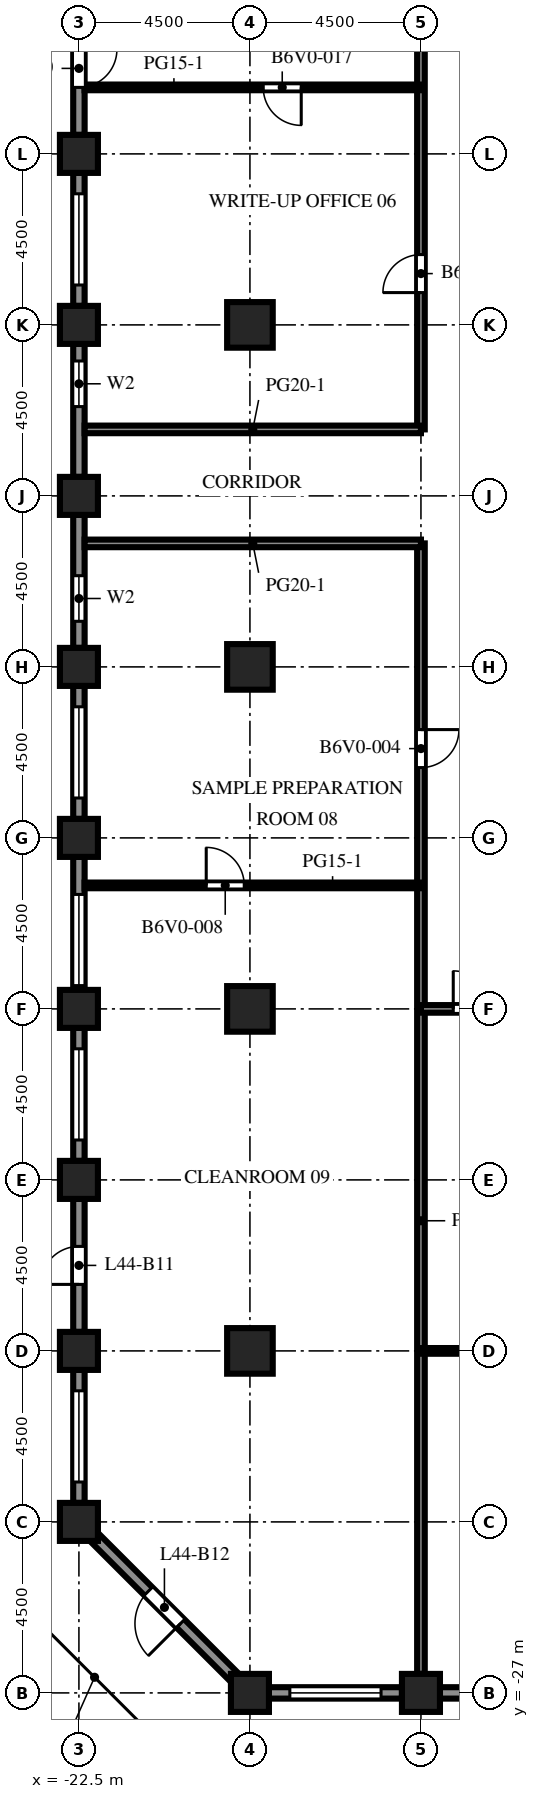
"""IFC4 building model, lengths in metres.
Left out: names, types, materials, properties, quantities, classifications, styles, units other than length and angle.
Written with IfcOpenShell. Run it as: python <this file> out.ifc"""

import sys

from ifc_helpers import new_model, si_unit, direction, frame, frame_2d, origin, origin_2d, place, context, subcontext, project, spatial, rectangle, extrude, element, fill, save


model = new_model("IFC4")
c1 = context("Model", 3, precision=1e-05, world=origin(), true_north=direction((0.0, 1.0)))
c2 = subcontext(c1, "Body", "Model", "MODEL_VIEW")
j1 = project(units=[si_unit("LENGTHUNIT", "METRE"), si_unit("PLANEANGLEUNIT", "RADIAN")], contexts=[c1])
p1 = place(None, origin())
s1 = spatial("IfcSite", under=j1, at=p1, CompositionType="ELEMENT")
p2 = place(p1, origin())
s2 = spatial("IfcBuilding", under=s1, at=p2, CompositionType="ELEMENT")
p3 = place(p2, frame((0.0, 0.0, 195.6)))
s3 = spatial("IfcBuildingStorey", under=s2, at=p3, CompositionType="ELEMENT", Elevation=195.6)
for number, where, z_axis, x_axis in (
    (1, (-22.5, -22.5, 0.0), (0.0, 0.0, 1.0), (1.0, 0.0, 0.0)),
    (2, (-22.5, -18.0, 0.0), (0.0, 0.0, 1.0), (1.0, 0.0, 0.0)),
    (3, (-22.5, -13.5, 0.0), (0.0, 0.0, 1.0), (1.0, 0.0, 0.0)),
    (4, (-22.5, -9.0, 0.0), (0.0, 0.0, 1.0), (1.0, 0.0, 0.0)),
    (5, (-22.5, -4.5, 0.0), (0.0, 0.0, 1.0), (1.0, 0.0, 0.0)),
    (6, (-22.5, 0.0, 0.0), (0.0, 0.0, 1.0), (1.0, 0.0, 0.0)),
    (7, (-22.5, 4.5, 0.0), (0.0, 0.0, 1.0), (1.0, 0.0, 0.0)),
    (8, (-22.5, 9.0, 0.0), (0.0, 0.0, 1.0), (1.0, 0.0, 0.0)),
    (9, (-22.5, 13.5, 0.0), (0.0, 0.0, 1.0), (1.0, 0.0, 0.0)),
    (10, (-18.0, -27.0, 0.0), (0.0, 0.0, 1.0), (1.0, 0.0, 0.0)),
    (11, (-13.5, -27.0, 0.0), (0.0, 0.0, 1.0), (1.0, 0.0, 0.0)),
):
    element("IfcColumn", number, at=place(p3, frame(where, z_axis=z_axis, x_axis=x_axis)), inside=s3, PredefinedType="COLUMN", context=c2, shape_type="SweptSolid", body=[
        extrude(rectangle(XDim=1.0, YDim=1.0, at=origin_2d()), origin(), (0.0, 0.0, 1.0), 4.1),
    ])
for number, where, z_axis, x_axis in (
    (12, (-18.0, -18.0, 0.0), (0.0, 0.0, 1.0), (1.0, 0.0, 0.0)),
    (13, (-18.0, -9.0, 0.0), (0.0, 0.0, 1.0), (1.0, 0.0, 0.0)),
    (14, (-18.0, 0.0, 0.0), (0.0, 0.0, 1.0), (1.0, 0.0, 0.0)),
    (15, (-18.0, 9.0, 0.0), (0.0, 0.0, 1.0), (1.0, 0.0, 0.0)),
):
    element("IfcColumn", number, at=place(p3, frame(where, z_axis=z_axis, x_axis=x_axis)), inside=s3, PredefinedType="COLUMN", context=c2, shape_type="SweptSolid", body=[
        extrude(rectangle(XDim=1.2, YDim=1.2, at=origin_2d()), origin(), (0.0, 0.0, 1.0), 4.1),
    ])
p4 = place(p3, frame((-14.0, -27.0, 0.0), z_axis=(0.0, 0.0, 1.0), x_axis=(-1.0, 0.0, 0.0)))
e16 = element("IfcWall", 16, at=p4, inside=s3, PredefinedType="SOLIDWALL", context=c2, shape_type="SweptSolid", body=[
    extrude(rectangle(XDim=3.5, YDim=0.3, at=frame_2d((1.75, 0.0))), origin(), (0.0, 0.0, 1.0), 2.85),
])
p5 = place(p4, frame((0.55, 0.0, 0.8)))
e17 = element("IfcOpeningElement", 17, at=p5, cuts=e16, PredefinedType="OPENING", context=c2, shape_type="SweptSolid", body=[
    extrude(rectangle(XDim=2.4, YDim=1.7, at=frame_2d((1.2, 0.85))), frame((0.0, 0.16, 0.0), z_axis=(0.0, -1.0, 0.0), x_axis=(1.0, 0.0, 0.0)), (0.0, 0.0, 1.0), 0.32),
])
p6 = place(p3, frame((-9.5, -27.0, 0.0), z_axis=(0.0, 0.0, 1.0), x_axis=(-1.0, 0.0, 0.0)))
e18 = element("IfcWall", 18, at=p6, inside=s3, PredefinedType="SOLIDWALL", context=c2, shape_type="SweptSolid", body=[
    extrude(rectangle(XDim=3.5, YDim=0.3, at=frame_2d((1.75, 0.0))), origin(), (0.0, 0.0, 1.0), 2.85),
])
p7 = place(p6, frame((1.25, 0.0, 0.0)))
e19 = element("IfcOpeningElement", 19, at=p7, cuts=e18, PredefinedType="OPENING", context=c2, shape_type="SweptSolid", body=[
    extrude(rectangle(XDim=1.0, YDim=2.2, at=frame_2d((0.5, 1.1))), frame((0.0, 0.16, 0.0), z_axis=(0.0, -1.0, 0.0), x_axis=(1.0, 0.0, 0.0)), (0.0, 0.0, 1.0), 0.32),
])
p8 = place(p3, frame((-22.5, 14.0, 0.0), z_axis=(0.0, 0.0, 1.0), x_axis=(0.0, 1.0, 0.0)))
e20 = element("IfcWall", 20, at=p8, inside=s3, PredefinedType="SOLIDWALL", context=c2, shape_type="SweptSolid", body=[
    extrude(rectangle(XDim=3.5, YDim=0.3, at=frame_2d((1.75, 0.0))), origin(), (0.0, 0.0, 1.0), 2.85),
])
p9 = place(p8, frame((1.25, 0.0, 0.0)))
e21 = element("IfcOpeningElement", 21, at=p9, cuts=e20, PredefinedType="OPENING", context=c2, shape_type="SweptSolid", body=[
    extrude(rectangle(XDim=1.0, YDim=2.2, at=frame_2d((0.5, 1.1))), frame((0.0, 0.16, 0.0), z_axis=(0.0, -1.0, 0.0), x_axis=(1.0, 0.0, 0.0)), (0.0, 0.0, 1.0), 0.32),
])
p10 = place(p3, frame((-22.5, 9.5, 0.0), z_axis=(0.0, 0.0, 1.0), x_axis=(0.0, 1.0, 0.0)))
e22 = element("IfcWall", 22, at=p10, inside=s3, PredefinedType="SOLIDWALL", context=c2, shape_type="SweptSolid", body=[
    extrude(rectangle(XDim=3.5, YDim=0.3, at=frame_2d((1.75, 0.0))), origin(), (0.0, 0.0, 1.0), 2.85),
])
p11 = place(p10, frame((0.55, 0.0, 0.8)))
e23 = element("IfcOpeningElement", 23, at=p11, cuts=e22, PredefinedType="OPENING", context=c2, shape_type="SweptSolid", body=[
    extrude(rectangle(XDim=2.4, YDim=1.7, at=frame_2d((1.2, 0.85))), frame((0.0, 0.16, 0.0), z_axis=(0.0, -1.0, 0.0), x_axis=(1.0, 0.0, 0.0)), (0.0, 0.0, 1.0), 0.32),
])
p12 = place(p3, frame((-22.5, 5.0, 0.0), z_axis=(0.0, 0.0, 1.0), x_axis=(0.0, 1.0, 0.0)))
e24 = element("IfcWall", 24, at=p12, inside=s3, PredefinedType="SOLIDWALL", context=c2, shape_type="SweptSolid", body=[
    extrude(rectangle(XDim=3.5, YDim=0.3, at=frame_2d((1.75, 0.0))), origin(), (0.0, 0.0, 1.0), 2.85),
])
p13 = place(p12, frame((1.85, 0.0, 0.8)))
e25 = element("IfcOpeningElement", 25, at=p13, cuts=e24, PredefinedType="OPENING", context=c2, shape_type="SweptSolid", body=[
    extrude(rectangle(XDim=1.2, YDim=1.7, at=frame_2d((0.6, 0.85))), frame((0.0, 0.16, 0.0), z_axis=(0.0, -1.0, 0.0), x_axis=(1.0, 0.0, 0.0)), (0.0, 0.0, 1.0), 0.32),
])
p14 = place(p3, frame((-22.5, 0.5, 0.0), z_axis=(0.0, 0.0, 1.0), x_axis=(0.0, 1.0, 0.0)))
e26 = element("IfcWall", 26, at=p14, inside=s3, PredefinedType="SOLIDWALL", context=c2, shape_type="SweptSolid", body=[
    extrude(rectangle(XDim=3.5, YDim=0.3, at=frame_2d((1.75, 0.0))), origin(), (0.0, 0.0, 1.0), 2.85),
])
p15 = place(p14, frame((0.7, 0.0, 0.8)))
e27 = element("IfcOpeningElement", 27, at=p15, cuts=e26, PredefinedType="OPENING", context=c2, shape_type="SweptSolid", body=[
    extrude(rectangle(XDim=1.2, YDim=1.7, at=frame_2d((0.6, 0.85))), frame((0.0, 0.16, 0.0), z_axis=(0.0, -1.0, 0.0), x_axis=(1.0, 0.0, 0.0)), (0.0, 0.0, 1.0), 0.32),
])
p16 = place(p3, frame((-22.5, -4.0, 0.0), z_axis=(0.0, 0.0, 1.0), x_axis=(0.0, 1.0, 0.0)))
e28 = element("IfcWall", 28, at=p16, inside=s3, PredefinedType="SOLIDWALL", context=c2, shape_type="SweptSolid", body=[
    extrude(rectangle(XDim=3.5, YDim=0.3, at=frame_2d((1.75, 0.0))), origin(), (0.0, 0.0, 1.0), 2.85),
])
p17 = place(p16, frame((0.55, 0.0, 0.8)))
e29 = element("IfcOpeningElement", 29, at=p17, cuts=e28, PredefinedType="OPENING", context=c2, shape_type="SweptSolid", body=[
    extrude(rectangle(XDim=2.4, YDim=1.7, at=frame_2d((1.2, 0.85))), frame((0.0, 0.16, 0.0), z_axis=(0.0, -1.0, 0.0), x_axis=(1.0, 0.0, 0.0)), (0.0, 0.0, 1.0), 0.32),
])
p18 = place(p3, frame((-22.5, -8.5, 0.0), z_axis=(0.0, 0.0, 1.0), x_axis=(0.0, 1.0, 0.0)))
e30 = element("IfcWall", 30, at=p18, inside=s3, PredefinedType="SOLIDWALL", context=c2, shape_type="SweptSolid", body=[
    extrude(rectangle(XDim=3.5, YDim=0.3, at=frame_2d((1.75, 0.0))), origin(), (0.0, 0.0, 1.0), 2.85),
])
p19 = place(p18, frame((0.113, 0.0, 0.8)))
e31 = element("IfcOpeningElement", 31, at=p19, cuts=e30, PredefinedType="OPENING", context=c2, shape_type="SweptSolid", body=[
    extrude(rectangle(XDim=2.4, YDim=1.7, at=frame_2d((1.2, 0.85))), frame((0.0, 0.16, 0.0), z_axis=(0.0, -1.0, 0.0), x_axis=(1.0, 0.0, 0.0)), (0.0, 0.0, 1.0), 0.32),
])
p20 = place(p3, frame((-22.5, -13.0, 0.0), z_axis=(0.0, 0.0, 1.0), x_axis=(0.0, 1.0, 0.0)))
e32 = element("IfcWall", 32, at=p20, inside=s3, PredefinedType="SOLIDWALL", context=c2, shape_type="SweptSolid", body=[
    extrude(rectangle(XDim=3.5, YDim=0.3, at=frame_2d((1.75, 0.0))), origin(), (0.0, 0.0, 1.0), 2.85),
])
p21 = place(p20, frame((0.55, 0.0, 0.8)))
e33 = element("IfcOpeningElement", 33, at=p21, cuts=e32, PredefinedType="OPENING", context=c2, shape_type="SweptSolid", body=[
    extrude(rectangle(XDim=2.4, YDim=1.7, at=frame_2d((1.2, 0.85))), frame((0.0, 0.16, 0.0), z_axis=(0.0, -1.0, 0.0), x_axis=(1.0, 0.0, 0.0)), (0.0, 0.0, 1.0), 0.32),
])
p22 = place(p3, frame((-22.5, -17.5, 0.0), z_axis=(0.0, 0.0, 1.0), x_axis=(0.0, 1.0, 0.0)))
e34 = element("IfcWall", 34, at=p22, inside=s3, PredefinedType="SOLIDWALL", context=c2, shape_type="SweptSolid", body=[
    extrude(rectangle(XDim=3.5, YDim=0.3, at=frame_2d((1.75, 0.0))), origin(), (0.0, 0.0, 1.0), 2.85),
])
p23 = place(p22, frame((1.25, 0.0, 0.0)))
e35 = element("IfcOpeningElement", 35, at=p23, cuts=e34, PredefinedType="OPENING", context=c2, shape_type="SweptSolid", body=[
    extrude(rectangle(XDim=1.0, YDim=2.2, at=frame_2d((0.5, 1.1))), frame((0.0, 0.16, 0.0), z_axis=(0.0, -1.0, 0.0), x_axis=(1.0, 0.0, 0.0)), (0.0, 0.0, 1.0), 0.32),
])
p24 = place(p3, frame((-22.5, -22.0, 0.0), z_axis=(0.0, 0.0, 1.0), x_axis=(0.0, 1.0, 0.0)))
e36 = element("IfcWall", 36, at=p24, inside=s3, PredefinedType="SOLIDWALL", context=c2, shape_type="SweptSolid", body=[
    extrude(rectangle(XDim=3.5, YDim=0.3, at=frame_2d((1.75, 0.0))), origin(), (0.0, 0.0, 1.0), 2.85),
])
p25 = place(p24, frame((0.55, 0.0, 0.8)))
e37 = element("IfcOpeningElement", 37, at=p25, cuts=e36, PredefinedType="OPENING", context=c2, shape_type="SweptSolid", body=[
    extrude(rectangle(XDim=2.4, YDim=1.7, at=frame_2d((1.2, 0.85))), frame((0.0, 0.16, 0.0), z_axis=(0.0, -1.0, 0.0), x_axis=(1.0, 0.0, 0.0)), (0.0, 0.0, 1.0), 0.32),
])
p26 = place(p3, frame((-18.394, -26.606, 0.0), z_axis=(0.0, 0.0, 1.0), x_axis=(-0.707106781187, 0.707106781187, 0.0)))
e38 = element("IfcWall", 38, at=p26, inside=s3, PredefinedType="SOLIDWALL", context=c2, shape_type="SweptSolid", body=[
    extrude(rectangle(XDim=5.25, YDim=0.3, at=frame_2d((2.625, 0.0))), origin(), (0.0, 0.0, 1.0), 2.85),
])
p27 = place(p26, frame((2.025, 0.0, 0.0)))
e39 = element("IfcOpeningElement", 39, at=p27, cuts=e38, PredefinedType="OPENING", context=c2, shape_type="SweptSolid", body=[
    extrude(rectangle(XDim=1.2, YDim=2.2, at=frame_2d((0.6, 1.1))), frame((0.0, 0.16, 0.0), z_axis=(0.0, -1.0, 0.0), x_axis=(1.0, 0.0, 0.0)), (0.0, 0.0, 1.0), 0.32),
])
p28 = place(p3, frame((-13.5, -26.5, 0.0), z_axis=(0.0, 0.0, 1.0), x_axis=(0.0, 1.0, 0.0)))
e40 = element("IfcWall", 40, at=p28, inside=s3, PredefinedType="PARTITIONING", context=c2, shape_type="SweptSolid", body=[
    extrude(rectangle(XDim=29.75, YDim=0.2, at=frame_2d((14.875, 0.0))), origin(), (0.0, 0.0, 1.0), 3.65),
])
p29 = place(p28, frame((23.85, 0.0, 0.0)))
e41 = element("IfcOpeningElement", 41, at=p29, cuts=e40, PredefinedType="OPENING", context=c2, shape_type="SweptSolid", body=[
    extrude(rectangle(XDim=1.0, YDim=2.1, at=frame_2d((0.5, 1.05))), frame((0.0, 0.11, 0.0), z_axis=(0.0, -1.0, 0.0), x_axis=(1.0, 0.0, 0.0)), (0.0, 0.0, 1.0), 0.22),
])
p30 = place(p3, frame((-13.5, 6.25, 0.0), z_axis=(0.0, 0.0, 1.0), x_axis=(0.0, 1.0, 0.0)))
e42 = element("IfcWall", 42, at=p30, inside=s3, PredefinedType="PARTITIONING", context=c2, shape_type="SweptSolid", body=[
    extrude(rectangle(XDim=20.25, YDim=0.2, at=frame_2d((10.125, 0.0))), origin(), (0.0, 0.0, 1.0), 3.65),
])
p31 = place(p30, frame((3.6, 0.0, 0.0)))
e43 = element("IfcOpeningElement", 43, at=p31, cuts=e42, PredefinedType="OPENING", context=c2, shape_type="SweptSolid", body=[
    extrude(rectangle(XDim=1.0, YDim=2.1, at=frame_2d((0.5, 1.05))), frame((0.0, 0.11, 0.0), z_axis=(0.0, -1.0, 0.0), x_axis=(1.0, 0.0, 0.0)), (0.0, 0.0, 1.0), 0.22),
])
p32 = place(p3, frame((-13.5, -18.0, 0.0), z_axis=(0.0, 0.0, 1.0), x_axis=(1.0, 0.0, 0.0)))
e44 = element("IfcWall", 44, at=p32, inside=s3, PredefinedType="PARTITIONING", context=c2, shape_type="SweptSolid", body=[
    extrude(rectangle(XDim=3.9, YDim=0.15, at=frame_2d((1.95, 0.0))), origin(), (0.0, 0.0, 1.0), 3.65),
])
p33 = place(p3, frame((-10.5, -9.0, 0.0), z_axis=(0.0, 0.0, 1.0), x_axis=(-1.0, 0.0, 0.0)))
e45 = element("IfcWall", 45, at=p33, inside=s3, PredefinedType="PARTITIONING", context=c2, shape_type="SweptSolid", body=[
    extrude(rectangle(XDim=3.0, YDim=0.2, at=frame_2d((1.5, 0.0))), origin(), (0.0, 0.0, 1.0), 3.65),
])
p34 = place(p33, frame((1.15, 0.0, 0.0)))
e46 = element("IfcOpeningElement", 46, at=p34, cuts=e45, PredefinedType="OPENING", context=c2, shape_type="SweptSolid", body=[
    extrude(rectangle(XDim=1.0, YDim=2.1, at=frame_2d((0.5, 1.05))), frame((0.0, 0.11, 0.0), z_axis=(0.0, -1.0, 0.0), x_axis=(1.0, 0.0, 0.0)), (0.0, 0.0, 1.0), 0.22),
])
p35 = place(p3, frame((-13.5, -5.75, 0.0), z_axis=(0.0, 0.0, 1.0), x_axis=(-1.0, 0.0, 0.0)))
e47 = element("IfcWall", 47, at=p35, inside=s3, PredefinedType="PARTITIONING", context=c2, shape_type="SweptSolid", body=[
    extrude(rectangle(XDim=8.85, YDim=0.15, at=frame_2d((4.425, 0.0))), origin(), (0.0, 0.0, 1.0), 3.65),
])
p36 = place(p35, frame((4.65, 0.0, 0.0)))
e48 = element("IfcOpeningElement", 48, at=p36, cuts=e47, PredefinedType="OPENING", context=c2, shape_type="SweptSolid", body=[
    extrude(rectangle(XDim=1.0, YDim=2.1, at=frame_2d((0.5, 1.05))), frame((0.0, 0.085, 0.0), z_axis=(0.0, -1.0, 0.0), x_axis=(1.0, 0.0, 0.0)), (0.0, 0.0, 1.0), 0.17),
])
for number, where, z_axis, x_axis in (
    (49, (-22.35, 3.25, 0.0), (0.0, 0.0, 1.0), (1.0, 0.0, 0.0)),
    (50, (-22.35, 6.25, 0.0), (0.0, 0.0, 1.0), (1.0, 0.0, 0.0)),
):
    element("IfcWall", number, at=place(p3, frame(where, z_axis=z_axis, x_axis=x_axis)), inside=s3, PredefinedType="PARTITIONING", context=c2, shape_type="SweptSolid", body=[
        extrude(rectangle(XDim=8.85, YDim=0.2, at=frame_2d((4.425, 0.0))), origin(), (0.0, 0.0, 1.0), 3.65),
    ])
p37 = place(p3, frame((-22.35, 15.25, 0.0), z_axis=(0.0, 0.0, 1.0), x_axis=(1.0, 0.0, 0.0)))
e51 = element("IfcWall", 51, at=p37, inside=s3, PredefinedType="PARTITIONING", context=c2, shape_type="SweptSolid", body=[
    extrude(rectangle(XDim=8.85, YDim=0.15, at=frame_2d((4.425, 0.0))), origin(), (0.0, 0.0, 1.0), 3.65),
])
p38 = place(p37, frame((4.7, 0.0, 0.0)))
e52 = element("IfcOpeningElement", 52, at=p38, cuts=e51, PredefinedType="OPENING", context=c2, shape_type="SweptSolid", body=[
    extrude(rectangle(XDim=1.0, YDim=2.1, at=frame_2d((0.5, 1.05))), frame((0.0, 0.085, 0.0), z_axis=(0.0, -1.0, 0.0), x_axis=(1.0, 0.0, 0.0)), (0.0, 0.0, 1.0), 0.17),
])
p39 = place(p5, origin())
e53 = element("IfcWindow", 53, at=p39, inside=s3, PartitioningType="SINGLE_PANEL", PredefinedType="WINDOW", context=c2, shape_type="SweptSolid", body=[
    extrude(rectangle(XDim=2.4, YDim=1.7, at=frame_2d((1.2, 0.85))), frame((0.0, 0.03, 0.0), z_axis=(0.0, -1.0, 0.0), x_axis=(1.0, 0.0, 0.0)), (0.0, 0.0, 1.0), 0.06),
])
fill(e17, e53)
p40 = place(p9, origin())
e54 = element("IfcDoor", 54, at=p40, inside=s3, OperationType="SINGLE_SWING_RIGHT", PredefinedType="DOOR", context=c2, shape_type="SweptSolid", body=[
    extrude(rectangle(XDim=1.0, YDim=2.2, at=frame_2d((0.5, 1.1))), frame((0.0, 0.025, 0.0), z_axis=(0.0, -1.0, 0.0), x_axis=(1.0, 0.0, 0.0)), (0.0, 0.0, 1.0), 0.05),
])
fill(e21, e54)
p41 = place(p11, origin())
e55 = element("IfcWindow", 55, at=p41, inside=s3, PartitioningType="SINGLE_PANEL", PredefinedType="WINDOW", context=c2, shape_type="SweptSolid", body=[
    extrude(rectangle(XDim=2.4, YDim=1.7, at=frame_2d((1.2, 0.85))), frame((0.0, 0.03, 0.0), z_axis=(0.0, -1.0, 0.0), x_axis=(1.0, 0.0, 0.0)), (0.0, 0.0, 1.0), 0.06),
])
fill(e23, e55)
p42 = place(p13, origin())
e56 = element("IfcWindow", 56, at=p42, inside=s3, PartitioningType="SINGLE_PANEL", PredefinedType="WINDOW", context=c2, shape_type="SweptSolid", body=[
    extrude(rectangle(XDim=1.2, YDim=1.7, at=frame_2d((0.6, 0.85))), frame((0.0, 0.03, 0.0), z_axis=(0.0, -1.0, 0.0), x_axis=(1.0, 0.0, 0.0)), (0.0, 0.0, 1.0), 0.06),
])
fill(e25, e56)
p43 = place(p15, origin())
e57 = element("IfcWindow", 57, at=p43, inside=s3, PartitioningType="SINGLE_PANEL", PredefinedType="WINDOW", context=c2, shape_type="SweptSolid", body=[
    extrude(rectangle(XDim=1.2, YDim=1.7, at=frame_2d((0.6, 0.85))), frame((0.0, 0.03, 0.0), z_axis=(0.0, -1.0, 0.0), x_axis=(1.0, 0.0, 0.0)), (0.0, 0.0, 1.0), 0.06),
])
fill(e27, e57)
p44 = place(p17, origin())
e58 = element("IfcWindow", 58, at=p44, inside=s3, PartitioningType="SINGLE_PANEL", PredefinedType="WINDOW", context=c2, shape_type="SweptSolid", body=[
    extrude(rectangle(XDim=2.4, YDim=1.7, at=frame_2d((1.2, 0.85))), frame((0.0, 0.03, 0.0), z_axis=(0.0, -1.0, 0.0), x_axis=(1.0, 0.0, 0.0)), (0.0, 0.0, 1.0), 0.06),
])
fill(e29, e58)
p45 = place(p19, origin())
e59 = element("IfcWindow", 59, at=p45, inside=s3, PartitioningType="SINGLE_PANEL", PredefinedType="WINDOW", context=c2, shape_type="SweptSolid", body=[
    extrude(rectangle(XDim=2.4, YDim=1.7, at=frame_2d((1.2, 0.85))), frame((0.0, 0.03, 0.0), z_axis=(0.0, -1.0, 0.0), x_axis=(1.0, 0.0, 0.0)), (0.0, 0.0, 1.0), 0.06),
])
fill(e31, e59)
p46 = place(p21, origin())
e60 = element("IfcWindow", 60, at=p46, inside=s3, PartitioningType="SINGLE_PANEL", PredefinedType="WINDOW", context=c2, shape_type="SweptSolid", body=[
    extrude(rectangle(XDim=2.4, YDim=1.7, at=frame_2d((1.2, 0.85))), frame((0.0, 0.03, 0.0), z_axis=(0.0, -1.0, 0.0), x_axis=(1.0, 0.0, 0.0)), (0.0, 0.0, 1.0), 0.06),
])
fill(e33, e60)
p47 = place(p23, origin())
e61 = element("IfcDoor", 61, at=p47, inside=s3, OperationType="SINGLE_SWING_LEFT", PredefinedType="DOOR", context=c2, shape_type="SweptSolid", body=[
    extrude(rectangle(XDim=1.0, YDim=2.2, at=frame_2d((0.5, 1.1))), frame((0.0, 0.025, 0.0), z_axis=(0.0, -1.0, 0.0), x_axis=(1.0, 0.0, 0.0)), (0.0, 0.0, 1.0), 0.05),
])
fill(e35, e61)
p48 = place(p25, origin())
e62 = element("IfcWindow", 62, at=p48, inside=s3, PartitioningType="SINGLE_PANEL", PredefinedType="WINDOW", context=c2, shape_type="SweptSolid", body=[
    extrude(rectangle(XDim=2.4, YDim=1.7, at=frame_2d((1.2, 0.85))), frame((0.0, 0.03, 0.0), z_axis=(0.0, -1.0, 0.0), x_axis=(1.0, 0.0, 0.0)), (0.0, 0.0, 1.0), 0.06),
])
fill(e37, e62)
p49 = place(p27, origin())
e63 = element("IfcDoor", 63, at=p49, inside=s3, OperationType="SINGLE_SWING_LEFT", PredefinedType="DOOR", context=c2, shape_type="SweptSolid", body=[
    extrude(rectangle(XDim=1.2, YDim=2.2, at=frame_2d((0.6, 1.1))), frame((0.0, 0.025, 0.0), z_axis=(0.0, -1.0, 0.0), x_axis=(1.0, 0.0, 0.0)), (0.0, 0.0, 1.0), 0.05),
])
fill(e39, e63)
p50 = place(p29, origin())
e64 = element("IfcDoor", 64, at=p50, inside=s3, OperationType="SINGLE_SWING_RIGHT", PredefinedType="DOOR", context=c2, shape_type="SweptSolid", body=[
    extrude(rectangle(XDim=1.0, YDim=2.1, at=frame_2d((0.5, 1.05))), frame((0.0, 0.025, 0.0), z_axis=(0.0, -1.0, 0.0), x_axis=(1.0, 0.0, 0.0)), (0.0, 0.0, 1.0), 0.05),
])
fill(e41, e64)
p51 = place(p31, origin())
e65 = element("IfcDoor", 65, at=p51, inside=s3, OperationType="SINGLE_SWING_LEFT", PredefinedType="DOOR", context=c2, shape_type="SweptSolid", body=[
    extrude(rectangle(XDim=1.0, YDim=2.1, at=frame_2d((0.5, 1.05))), frame((0.0, 0.025, 0.0), z_axis=(0.0, -1.0, 0.0), x_axis=(1.0, 0.0, 0.0)), (0.0, 0.0, 1.0), 0.05),
])
fill(e43, e65)
p52 = place(p34, origin())
e66 = element("IfcDoor", 66, at=p52, inside=s3, OperationType="SINGLE_SWING_RIGHT", PredefinedType="DOOR", context=c2, shape_type="SweptSolid", body=[
    extrude(rectangle(XDim=1.0, YDim=2.1, at=frame_2d((0.5, 1.05))), frame((0.0, 0.025, 0.0), z_axis=(0.0, -1.0, 0.0), x_axis=(1.0, 0.0, 0.0)), (0.0, 0.0, 1.0), 0.05),
])
fill(e46, e66)
p53 = place(p36, origin())
e67 = element("IfcDoor", 67, at=p53, inside=s3, OperationType="SINGLE_SWING_RIGHT", PredefinedType="DOOR", context=c2, shape_type="SweptSolid", body=[
    extrude(rectangle(XDim=1.0, YDim=2.1, at=frame_2d((0.5, 1.05))), frame((0.0, 0.025, 0.0), z_axis=(0.0, -1.0, 0.0), x_axis=(1.0, 0.0, 0.0)), (0.0, 0.0, 1.0), 0.05),
])
fill(e48, e67)
p54 = place(p38, origin())
e68 = element("IfcDoor", 68, at=p54, inside=s3, OperationType="SINGLE_SWING_RIGHT", PredefinedType="DOOR", context=c2, shape_type="SweptSolid", body=[
    extrude(rectangle(XDim=1.0, YDim=2.1, at=frame_2d((0.5, 1.05))), frame((0.0, 0.025, 0.0), z_axis=(0.0, -1.0, 0.0), x_axis=(1.0, 0.0, 0.0)), (0.0, 0.0, 1.0), 0.05),
])
fill(e52, e68)
save(model, sys.argv[1])
